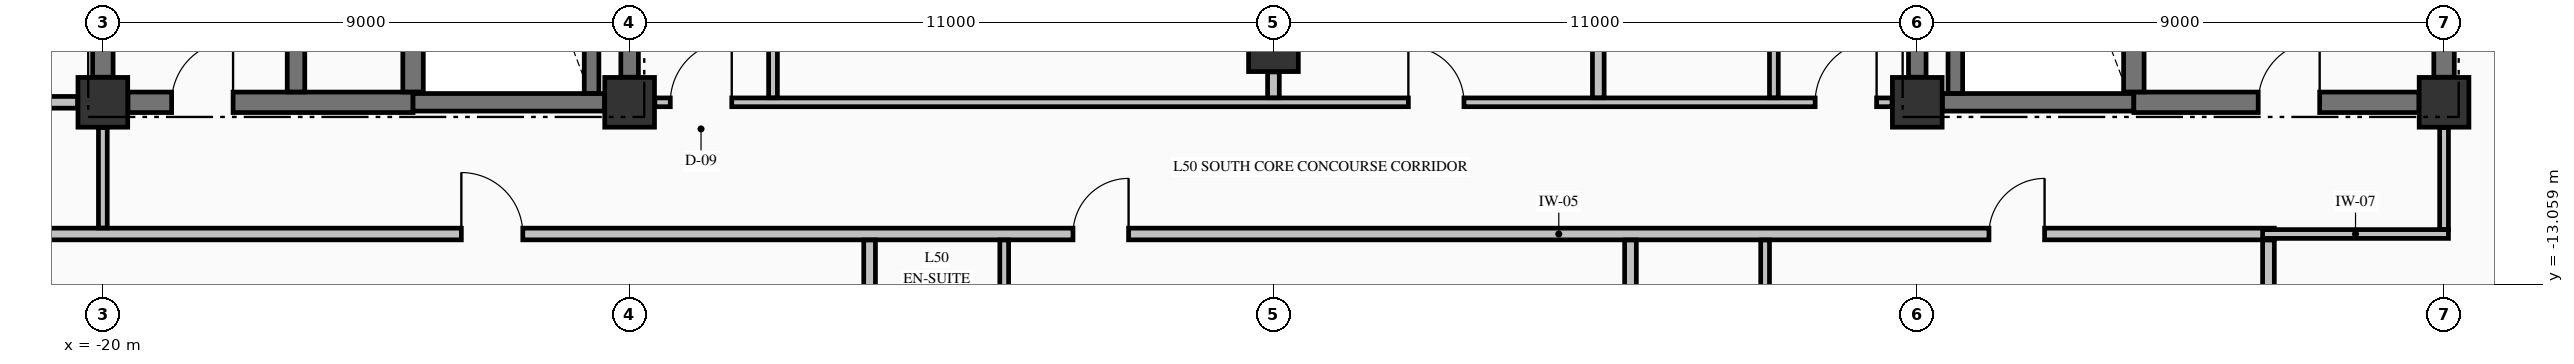
"""IFC4 building model, lengths in metres.
Left out: names, types, materials, properties, quantities, classifications, styles, units other than length and angle.
Written with IfcOpenShell. Run it as: python <this file> out.ifc"""

import sys

from ifc_helpers import new_model, si_unit, direction, frame, frame_2d, origin, origin_2d, place, context, subcontext, project, spatial, rectangle, extrude, element, fill, save


model = new_model("IFC4")
c1 = context("Model", 3, precision=1e-05, world=origin(), true_north=direction((0.0, 1.0)))
c2 = subcontext(c1, "Body", "Model", "MODEL_VIEW")
j1 = project(units=[si_unit("LENGTHUNIT", "METRE"), si_unit("PLANEANGLEUNIT", "RADIAN")], contexts=[c1])
p1 = place(None, origin())
s1 = spatial("IfcSite", under=j1, at=p1, CompositionType="ELEMENT")
p2 = place(p1, origin())
s2 = spatial("IfcBuilding", under=s1, at=p2, CompositionType="ELEMENT")
p3 = place(p2, frame((0.0, 0.0, 194.86)))
s3 = spatial("IfcBuildingStorey", under=s2, at=p3, CompositionType="ELEMENT", Elevation=194.86)
for number, where, z_axis, x_axis in (
    (1, (-20.0, -9.95, -0.275), (0.0, 0.0, 1.0), (1.0, 0.0, 0.0)),
    (2, (-11.0, -9.95, -0.275), (0.0, 0.0, 1.0), (1.0, 0.0, 0.0)),
    (3, (11.0, -9.95, -0.275), (0.0, 0.0, 1.0), (1.0, 0.0, 0.0)),
    (4, (20.0, -9.95, -0.275), (0.0, 0.0, 1.0), (1.0, 0.0, 0.0)),
    (5, (0.0, -9.0, -0.275), (0.0, 0.0, 1.0), (1.0, 0.0, 0.0)),
):
    element("IfcColumn", number, at=place(p3, frame(where, z_axis=z_axis, x_axis=x_axis)), inside=s3, PredefinedType="COLUMN", context=c2, shape_type="SweptSolid", body=[
        extrude(rectangle(XDim=0.85, YDim=0.85, at=origin_2d()), origin(), (0.0, 0.0, 1.0), 3.425),
    ])
p4 = place(p3, frame((-19.571, -9.95, 0.0), z_axis=(0.0, 0.0, 1.0), x_axis=(1.0, 0.0, 0.0)))
e6 = element("IfcWall", 6, at=p4, inside=s3, PredefinedType="SHEAR", context=c2, shape_type="SweptSolid", body=[
    extrude(rectangle(XDim=4.871, YDim=0.35, at=frame_2d((2.436, 0.0))), origin(), (0.0, 0.0, 1.0), 3.15),
])
p5 = place(p4, frame((0.746, 0.0, 0.0)))
e7 = element("IfcOpeningElement", 7, at=p5, cuts=e6, PredefinedType="OPENING", context=c2, shape_type="SweptSolid", body=[
    extrude(rectangle(XDim=1.05, YDim=2.15, at=frame_2d((0.525, 1.075))), frame((0.0, 0.185, 0.0), z_axis=(0.0, -1.0, 0.0), x_axis=(1.0, 0.0, 0.0)), (0.0, 0.0, 1.0), 0.37),
])
for number, where, z_axis, x_axis in (
    (8, (-14.7, -9.95, 0.0), (0.0, 0.0, 1.0), (1.0, 0.0, 0.0)),
    (9, (11.429, -9.95, 0.0), (0.0, 0.0, 1.0), (1.0, 0.0, 0.0)),
):
    element("IfcWall", number, at=place(p3, frame(where, z_axis=z_axis, x_axis=x_axis)), inside=s3, PredefinedType="SHEAR", context=c2, shape_type="SweptSolid", body=[
        extrude(rectangle(XDim=3.271, YDim=0.3, at=frame_2d((1.635, 0.0))), origin(), (0.0, 0.0, 1.0), 3.15),
    ])
p6 = place(p3, frame((14.7, -9.95, 0.0), z_axis=(0.0, 0.0, 1.0), x_axis=(1.0, 0.0, 0.0)))
e10 = element("IfcWall", 10, at=p6, inside=s3, PredefinedType="SHEAR", context=c2, shape_type="SweptSolid", body=[
    extrude(rectangle(XDim=4.871, YDim=0.35, at=frame_2d((2.436, 0.0))), origin(), (0.0, 0.0, 1.0), 3.15),
])
p7 = place(p6, frame((2.125, 0.0, 0.0)))
e11 = element("IfcOpeningElement", 11, at=p7, cuts=e10, PredefinedType="OPENING", context=c2, shape_type="SweptSolid", body=[
    extrude(rectangle(XDim=1.05, YDim=2.15, at=frame_2d((0.525, 1.075))), frame((0.0, 0.185, 0.0), z_axis=(0.0, -1.0, 0.0), x_axis=(1.0, 0.0, 0.0)), (0.0, 0.0, 1.0), 0.37),
])
p8 = place(p3, frame((-22.1, -12.2, 0.0), z_axis=(0.0, 0.0, 1.0), x_axis=(1.0, 0.0, 0.0)))
e12 = element("IfcWall", 12, at=p8, inside=s3, PredefinedType="PARTITIONING", context=c2, shape_type="SweptSolid", body=[
    extrude(rectangle(XDim=39.2, YDim=0.2, at=frame_2d((19.6, 0.0))), origin(), (0.0, 0.0, 1.0), 3.15),
])
p9 = place(p8, frame((8.225, 0.0, 0.0)))
e13 = element("IfcOpeningElement", 13, at=p9, cuts=e12, PredefinedType="OPENING", context=c2, shape_type="SweptSolid", body=[
    extrude(rectangle(XDim=1.05, YDim=2.15, at=frame_2d((0.525, 1.075))), frame((0.0, 0.11, 0.0), z_axis=(0.0, -1.0, 0.0), x_axis=(1.0, 0.0, 0.0)), (0.0, 0.0, 1.0), 0.22),
])
p10 = place(p8, frame((18.675, 0.0, 0.0)))
e14 = element("IfcOpeningElement", 14, at=p10, cuts=e12, PredefinedType="OPENING", context=c2, shape_type="SweptSolid", body=[
    extrude(rectangle(XDim=0.95, YDim=2.15, at=frame_2d((0.475, 1.075))), frame((0.0, 0.11, 0.0), z_axis=(0.0, -1.0, 0.0), x_axis=(1.0, 0.0, 0.0)), (0.0, 0.0, 1.0), 0.22),
])
p11 = place(p8, frame((34.325, 0.0, 0.0)))
e15 = element("IfcOpeningElement", 15, at=p11, cuts=e12, PredefinedType="OPENING", context=c2, shape_type="SweptSolid", body=[
    extrude(rectangle(XDim=0.95, YDim=2.15, at=frame_2d((0.475, 1.075))), frame((0.0, 0.11, 0.0), z_axis=(0.0, -1.0, 0.0), x_axis=(1.0, 0.0, 0.0)), (0.0, 0.0, 1.0), 0.22),
])
p12 = place(p3, frame((16.9, -12.2, 0.0), z_axis=(0.0, 0.0, 1.0), x_axis=(1.0, 0.0, 0.0)))
e16 = element("IfcWall", 16, at=p12, inside=s3, PredefinedType="PARTITIONING", context=c2, shape_type="SweptSolid", body=[
    extrude(rectangle(XDim=3.175, YDim=0.15, at=frame_2d((1.587, 0.0))), origin(), (0.0, 0.0, 1.0), 3.15),
])
p13 = place(p3, frame((-26.835, -9.95, 0.0), z_axis=(0.0, 0.0, 1.0), x_axis=(1.0, 0.0, 0.0)))
e17 = element("IfcWall", 17, at=p13, inside=s3, PredefinedType="PARTITIONING", context=c2, shape_type="SweptSolid", body=[
    extrude(rectangle(XDim=6.404, YDim=0.2, at=frame_2d((3.202, 0.0))), origin(), (0.0, 0.0, 1.0), 3.15),
])
p14 = place(p3, frame((-10.569, -9.95, 0.0), z_axis=(0.0, 0.0, 1.0), x_axis=(1.0, 0.0, 0.0)))
e18 = element("IfcWall", 18, at=p14, inside=s3, PredefinedType="PARTITIONING", context=c2, shape_type="SweptSolid", body=[
    extrude(rectangle(XDim=21.138, YDim=0.15, at=frame_2d((10.569, 0.0))), origin(), (0.0, 0.0, 1.0), 3.15),
])
p15 = place(p14, frame((0.264, 0.0, 0.0)))
e19 = element("IfcOpeningElement", 19, at=p15, cuts=e18, PredefinedType="OPENING", context=c2, shape_type="SweptSolid", body=[
    extrude(rectangle(XDim=1.05, YDim=2.15, at=frame_2d((0.525, 1.075))), frame((0.0, 0.085, 0.0), z_axis=(0.0, -1.0, 0.0), x_axis=(1.0, 0.0, 0.0)), (0.0, 0.0, 1.0), 0.17),
])
p16 = place(p14, frame((19.824, 0.0, 0.0)))
e20 = element("IfcOpeningElement", 20, at=p16, cuts=e18, PredefinedType="OPENING", context=c2, shape_type="SweptSolid", body=[
    extrude(rectangle(XDim=1.05, YDim=2.15, at=frame_2d((0.525, 1.075))), frame((0.0, 0.085, 0.0), z_axis=(0.0, -1.0, 0.0), x_axis=(1.0, 0.0, 0.0)), (0.0, 0.0, 1.0), 0.17),
])
p17 = place(p14, frame((12.874, 0.0, 0.0)))
e21 = element("IfcOpeningElement", 21, at=p17, cuts=e18, PredefinedType="OPENING", context=c2, shape_type="SweptSolid", body=[
    extrude(rectangle(XDim=0.95, YDim=2.15, at=frame_2d((0.475, 1.075))), frame((0.0, 0.085, 0.0), z_axis=(0.0, -1.0, 0.0), x_axis=(1.0, 0.0, 0.0)), (0.0, 0.0, 1.0), 0.17),
])
p18 = place(p3, frame((-20.0, -9.521, 0.0), z_axis=(0.0, 0.0, 1.0), x_axis=(0.0, 1.0, 0.0)))
e22 = element("IfcWall", 22, at=p18, inside=s3, PredefinedType="SHEAR", context=c2, shape_type="SweptSolid", body=[
    extrude(rectangle(XDim=9.092, YDim=0.35, at=frame_2d((4.546, 0.0))), origin(), (0.0, 0.0, 1.0), 3.15),
])
p19 = place(p3, frame((-16.7, -9.773, 0.0), z_axis=(0.0, 0.0, 1.0), x_axis=(0.0, 1.0, 0.0)))
e23 = element("IfcWall", 23, at=p19, inside=s3, PredefinedType="SHEAR", context=c2, shape_type="SweptSolid", body=[
    extrude(rectangle(XDim=9.371, YDim=0.3, at=frame_2d((4.686, 0.0))), origin(), (0.0, 0.0, 1.0), 3.15),
])
p20 = place(p3, frame((-14.7, -9.773, 0.0), z_axis=(0.0, 0.0, 1.0), x_axis=(0.0, 1.0, 0.0)))
e24 = element("IfcWall", 24, at=p20, inside=s3, PredefinedType="SHEAR", context=c2, shape_type="SweptSolid", body=[
    extrude(rectangle(XDim=9.371, YDim=0.35, at=frame_2d((4.686, 0.0))), origin(), (0.0, 0.0, 1.0), 3.15),
])
p21 = place(p3, frame((-11.65, -9.798, 0.0), z_axis=(0.0, 0.0, 1.0), x_axis=(0.0, 1.0, 0.0)))
e25 = element("IfcWall", 25, at=p21, inside=s3, PredefinedType="SOLIDWALL", context=c2, shape_type="SweptSolid", body=[
    extrude(rectangle(XDim=9.396, YDim=0.25, at=frame_2d((4.698, 0.0))), origin(), (0.0, 0.0, 1.0), 3.15),
])
for number, where, z_axis, x_axis in (
    (26, (-11.0, -9.521, 0.0), (0.0, 0.0, 1.0), (0.0, 1.0, 0.0)),
    (27, (11.0, -9.521, 0.0), (0.0, 0.0, 1.0), (0.0, 1.0, 0.0)),
):
    element("IfcWall", number, at=place(p3, frame(where, z_axis=z_axis, x_axis=x_axis)), inside=s3, PredefinedType="SHEAR", context=c2, shape_type="SweptSolid", body=[
        extrude(rectangle(XDim=9.092, YDim=0.3, at=frame_2d((4.546, 0.0))), origin(), (0.0, 0.0, 1.0), 3.15),
    ])
p22 = place(p3, frame((11.65, -9.798, 0.0), z_axis=(0.0, 0.0, 1.0), x_axis=(0.0, 1.0, 0.0)))
e28 = element("IfcWall", 28, at=p22, inside=s3, PredefinedType="SOLIDWALL", context=c2, shape_type="SweptSolid", body=[
    extrude(rectangle(XDim=9.396, YDim=0.25, at=frame_2d((4.698, 0.0))), origin(), (0.0, 0.0, 1.0), 3.15),
])
p23 = place(p3, frame((14.7, -9.773, 0.0), z_axis=(0.0, 0.0, 1.0), x_axis=(0.0, 1.0, 0.0)))
e29 = element("IfcWall", 29, at=p23, inside=s3, PredefinedType="SHEAR", context=c2, shape_type="SweptSolid", body=[
    extrude(rectangle(XDim=9.371, YDim=0.35, at=frame_2d((4.686, 0.0))), origin(), (0.0, 0.0, 1.0), 3.15),
])
p24 = place(p3, frame((20.0, -9.521, 0.0), z_axis=(0.0, 0.0, 1.0), x_axis=(0.0, 1.0, 0.0)))
e30 = element("IfcWall", 30, at=p24, inside=s3, PredefinedType="SHEAR", context=c2, shape_type="SweptSolid", body=[
    extrude(rectangle(XDim=9.092, YDim=0.35, at=frame_2d((4.546, 0.0))), origin(), (0.0, 0.0, 1.0), 3.15),
])
p25 = place(p3, frame((-20.0, -12.097, 0.0), z_axis=(0.0, 0.0, 1.0), x_axis=(0.0, 1.0, 0.0)))
e31 = element("IfcWall", 31, at=p25, inside=s3, PredefinedType="PARTITIONING", context=c2, shape_type="SweptSolid", body=[
    extrude(rectangle(XDim=1.716, YDim=0.15, at=frame_2d((0.858, 0.0))), origin(), (0.0, 0.0, 1.0), 2.342),
])
p26 = place(p3, frame((-8.55, -9.872, 0.0), z_axis=(0.0, 0.0, 1.0), x_axis=(0.0, 1.0, 0.0)))
e32 = element("IfcWall", 32, at=p26, inside=s3, PredefinedType="PARTITIONING", context=c2, shape_type="SweptSolid", body=[
    extrude(rectangle(XDim=8.569, YDim=0.15, at=frame_2d((4.285, 0.0))), origin(), (0.0, 0.0, 1.0), 3.15),
])
p27 = place(p26, frame((3.802, 0.0, 0.0)))
e33 = element("IfcOpeningElement", 33, at=p27, cuts=e32, PredefinedType="OPENING", context=c2, shape_type="SweptSolid", body=[
    extrude(rectangle(XDim=1.0, YDim=2.15, at=frame_2d((0.5, 1.075))), frame((0.0, 0.085, 0.0), z_axis=(0.0, -1.0, 0.0), x_axis=(1.0, 0.0, 0.0)), (0.0, 0.0, 1.0), 0.17),
])
p28 = place(p3, frame((-6.9, -15.072, 0.0), z_axis=(0.0, 0.0, 1.0), x_axis=(0.0, 1.0, 0.0)))
e34 = element("IfcWall", 34, at=p28, inside=s3, PredefinedType="PARTITIONING", context=c2, shape_type="SweptSolid", body=[
    extrude(rectangle(XDim=2.769, YDim=0.2, at=frame_2d((1.385, 0.0))), origin(), (0.0, 0.0, 1.0), 3.15),
])
p29 = place(p3, frame((-4.6, -15.072, 0.0), z_axis=(0.0, 0.0, 1.0), x_axis=(0.0, 1.0, 0.0)))
e35 = element("IfcWall", 35, at=p29, inside=s3, PredefinedType="PARTITIONING", context=c2, shape_type="SweptSolid", body=[
    extrude(rectangle(XDim=2.769, YDim=0.15, at=frame_2d((1.385, 0.0))), origin(), (0.0, 0.0, 1.0), 3.15),
])
p30 = place(p3, frame((0.0, -9.872, 0.0), z_axis=(0.0, 0.0, 1.0), x_axis=(0.0, 1.0, 0.0)))
e36 = element("IfcWall", 36, at=p30, inside=s3, PredefinedType="PARTITIONING", context=c2, shape_type="SweptSolid", body=[
    extrude(rectangle(XDim=0.441, YDim=0.2, at=frame_2d((0.221, 0.0))), origin(), (0.0, 0.0, 1.0), 2.342),
])
p31 = place(p3, frame((5.55, -9.872, 0.0), z_axis=(0.0, 0.0, 1.0), x_axis=(0.0, 1.0, 0.0)))
e37 = element("IfcWall", 37, at=p31, inside=s3, PredefinedType="PARTITIONING", context=c2, shape_type="SweptSolid", body=[
    extrude(rectangle(XDim=4.569, YDim=0.2, at=frame_2d((2.285, 0.0))), origin(), (0.0, 0.0, 1.0), 3.15),
])
p32 = place(p3, frame((6.1, -14.372, 0.0), z_axis=(0.0, 0.0, 1.0), x_axis=(0.0, 1.0, 0.0)))
e38 = element("IfcWall", 38, at=p32, inside=s3, PredefinedType="PARTITIONING", context=c2, shape_type="SweptSolid", body=[
    extrude(rectangle(XDim=2.069, YDim=0.2, at=frame_2d((1.035, 0.0))), origin(), (0.0, 0.0, 1.0), 3.15),
])
p33 = place(p3, frame((8.4, -14.372, 0.0), z_axis=(0.0, 0.0, 1.0), x_axis=(0.0, 1.0, 0.0)))
e39 = element("IfcWall", 39, at=p33, inside=s3, PredefinedType="PARTITIONING", context=c2, shape_type="SweptSolid", body=[
    extrude(rectangle(XDim=2.069, YDim=0.15, at=frame_2d((1.035, 0.0))), origin(), (0.0, 0.0, 1.0), 3.15),
])
p34 = place(p3, frame((8.55, -9.872, 0.0), z_axis=(0.0, 0.0, 1.0), x_axis=(0.0, 1.0, 0.0)))
e40 = element("IfcWall", 40, at=p34, inside=s3, PredefinedType="PARTITIONING", context=c2, shape_type="SweptSolid", body=[
    extrude(rectangle(XDim=4.569, YDim=0.15, at=frame_2d((2.285, 0.0))), origin(), (0.0, 0.0, 1.0), 3.15),
])
p35 = place(p34, frame((1.847, 0.0, 0.0)))
e41 = element("IfcOpeningElement", 41, at=p35, cuts=e40, PredefinedType="OPENING", context=c2, shape_type="SweptSolid", body=[
    extrude(rectangle(XDim=0.95, YDim=2.15, at=frame_2d((0.475, 1.075))), frame((0.0, 0.085, 0.0), z_axis=(0.0, -1.0, 0.0), x_axis=(1.0, 0.0, 0.0)), (0.0, 0.0, 1.0), 0.17),
])
p36 = place(p3, frame((17.0, -18.994, 0.0), z_axis=(0.0, 0.0, 1.0), x_axis=(0.0, 1.0, 0.0)))
e42 = element("IfcWall", 42, at=p36, inside=s3, PredefinedType="PARTITIONING", context=c2, shape_type="SweptSolid", body=[
    extrude(rectangle(XDim=6.691, YDim=0.2, at=frame_2d((3.345, 0.0))), origin(), (0.0, 0.0, 1.0), 3.15),
])
p37 = place(p3, frame((20.0, -12.122, 0.0), z_axis=(0.0, 0.0, 1.0), x_axis=(0.0, 1.0, 0.0)))
e43 = element("IfcWall", 43, at=p37, inside=s3, PredefinedType="PARTITIONING", context=c2, shape_type="SweptSolid", body=[
    extrude(rectangle(XDim=1.741, YDim=0.15, at=frame_2d((0.871, 0.0))), origin(), (0.0, 0.0, 1.0), 2.342),
])
p38 = place(p5, origin())
e44 = element("IfcDoor", 44, at=p38, inside=s3, OperationType="SINGLE_SWING_RIGHT", PredefinedType="DOOR", context=c2, shape_type="SweptSolid", body=[
    extrude(rectangle(XDim=1.05, YDim=2.15, at=frame_2d((0.525, 1.075))), frame((0.0, 0.025, 0.0), z_axis=(0.0, -1.0, 0.0), x_axis=(1.0, 0.0, 0.0)), (0.0, 0.0, 1.0), 0.05),
])
fill(e7, e44)
p39 = place(p7, origin())
e45 = element("IfcDoor", 45, at=p39, inside=s3, OperationType="SINGLE_SWING_RIGHT", PredefinedType="DOOR", context=c2, shape_type="SweptSolid", body=[
    extrude(rectangle(XDim=1.05, YDim=2.15, at=frame_2d((0.525, 1.075))), frame((0.0, 0.025, 0.0), z_axis=(0.0, -1.0, 0.0), x_axis=(1.0, 0.0, 0.0)), (0.0, 0.0, 1.0), 0.05),
])
fill(e11, e45)
p40 = place(p15, origin())
e46 = element("IfcDoor", 46, at=p40, inside=s3, OperationType="SINGLE_SWING_RIGHT", PredefinedType="DOOR", context=c2, shape_type="SweptSolid", body=[
    extrude(rectangle(XDim=1.05, YDim=2.15, at=frame_2d((0.525, 1.075))), frame((0.0, 0.025, 0.0), z_axis=(0.0, -1.0, 0.0), x_axis=(1.0, 0.0, 0.0)), (0.0, 0.0, 1.0), 0.05),
])
fill(e19, e46)
p41 = place(p16, origin())
e47 = element("IfcDoor", 47, at=p41, inside=s3, OperationType="SINGLE_SWING_RIGHT", PredefinedType="DOOR", context=c2, shape_type="SweptSolid", body=[
    extrude(rectangle(XDim=1.05, YDim=2.15, at=frame_2d((0.525, 1.075))), frame((0.0, 0.025, 0.0), z_axis=(0.0, -1.0, 0.0), x_axis=(1.0, 0.0, 0.0)), (0.0, 0.0, 1.0), 0.05),
])
fill(e20, e47)
p42 = place(p9, origin())
e48 = element("IfcDoor", 48, at=p42, inside=s3, OperationType="SINGLE_SWING_LEFT", PredefinedType="DOOR", context=c2, shape_type="SweptSolid", body=[
    extrude(rectangle(XDim=1.05, YDim=2.15, at=frame_2d((0.525, 1.075))), frame((0.0, 0.025, 0.0), z_axis=(0.0, -1.0, 0.0), x_axis=(1.0, 0.0, 0.0)), (0.0, 0.0, 1.0), 0.05),
])
fill(e13, e48)
p43 = place(p10, origin())
e49 = element("IfcDoor", 49, at=p43, inside=s3, OperationType="SINGLE_SWING_RIGHT", PredefinedType="DOOR", context=c2, shape_type="SweptSolid", body=[
    extrude(rectangle(XDim=0.95, YDim=2.15, at=frame_2d((0.475, 1.075))), frame((0.0, 0.025, 0.0), z_axis=(0.0, -1.0, 0.0), x_axis=(1.0, 0.0, 0.0)), (0.0, 0.0, 1.0), 0.05),
])
fill(e14, e49)
p44 = place(p11, origin())
e50 = element("IfcDoor", 50, at=p44, inside=s3, OperationType="SINGLE_SWING_RIGHT", PredefinedType="DOOR", context=c2, shape_type="SweptSolid", body=[
    extrude(rectangle(XDim=0.95, YDim=2.15, at=frame_2d((0.475, 1.075))), frame((0.0, 0.025, 0.0), z_axis=(0.0, -1.0, 0.0), x_axis=(1.0, 0.0, 0.0)), (0.0, 0.0, 1.0), 0.05),
])
fill(e15, e50)
p45 = place(p17, origin())
e51 = element("IfcDoor", 51, at=p45, inside=s3, OperationType="SINGLE_SWING_LEFT", PredefinedType="DOOR", context=c2, shape_type="SweptSolid", body=[
    extrude(rectangle(XDim=0.95, YDim=2.15, at=frame_2d((0.475, 1.075))), frame((0.0, 0.025, 0.0), z_axis=(0.0, -1.0, 0.0), x_axis=(1.0, 0.0, 0.0)), (0.0, 0.0, 1.0), 0.05),
])
fill(e21, e51)
save(model, sys.argv[1])
